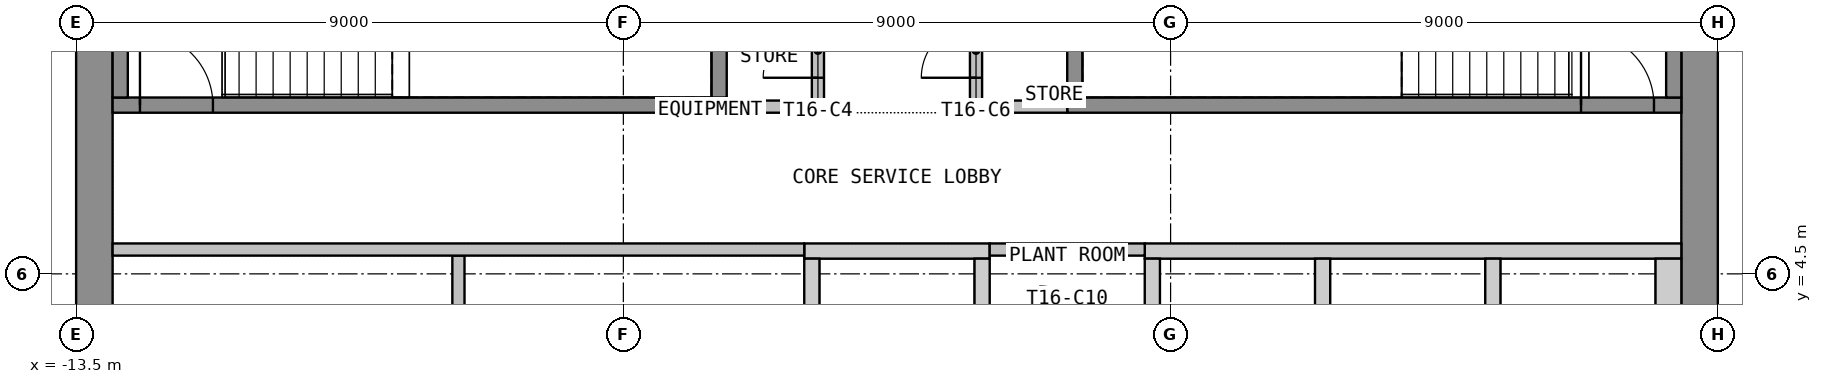
"""IFC4 building model, lengths in metres.
Left out: names, types, materials, properties, quantities, classifications, styles, units other than length and angle.
Written with IfcOpenShell. Run it as: python <this file> out.ifc"""

import sys

from ifc_helpers import new_model, si_unit, direction, frame, frame_2d, origin, place, context, subcontext, project, spatial, polyline, rectangle, outline, extrude, element, fill, save


model = new_model("IFC4")
c1 = context("Model", 3, precision=1e-05, world=origin(), true_north=direction((0.0, 1.0)))
c2 = subcontext(c1, "Body", "Model", "MODEL_VIEW")
j1 = project(units=[si_unit("LENGTHUNIT", "METRE"), si_unit("PLANEANGLEUNIT", "RADIAN")], contexts=[c1])
p1 = place(None, origin())
s1 = spatial("IfcSite", under=j1, at=p1, CompositionType="ELEMENT")
p2 = place(p1, origin())
s2 = spatial("IfcBuilding", under=s1, at=p2, CompositionType="ELEMENT")
p3 = place(p2, frame((0.0, 0.0, 219.0)))
s3 = spatial("IfcBuildingStorey", under=s2, at=p3, CompositionType="ELEMENT", Elevation=219.0)
p4 = place(p3, frame((-13.2, -10.65, 0.0), z_axis=(0.0, 0.0, 1.0), x_axis=(0.0, 1.0, 0.0)))
e1 = element("IfcWall", 1, at=p4, inside=s3, PredefinedType="SHEAR", context=c2, shape_type="SweptSolid", body=[
    extrude(rectangle(XDim=21.3, YDim=0.6, at=frame_2d((10.65, 0.0))), origin(), (0.0, 0.0, 1.0), 3.55),
])
p5 = place(p4, frame((9.45, 0.0, 0.0)))
e2 = element("IfcOpeningElement", 2, at=p5, cuts=e1, PredefinedType="OPENING", context=c2, shape_type="SweptSolid", body=[
    extrude(rectangle(XDim=2.4, YDim=2.1, at=frame_2d((1.2, 1.05))), frame((0.0, 0.31, 0.0), z_axis=(0.0, -1.0, 0.0), x_axis=(1.0, 0.0, 0.0)), (0.0, 0.0, 1.0), 0.62),
])
p6 = place(p3, frame((13.2, -10.65, 0.0), z_axis=(0.0, 0.0, 1.0), x_axis=(0.0, 1.0, 0.0)))
e3 = element("IfcWall", 3, at=p6, inside=s3, PredefinedType="SHEAR", context=c2, shape_type="SweptSolid", body=[
    extrude(rectangle(XDim=21.3, YDim=0.6, at=frame_2d((10.65, 0.0))), origin(), (0.0, 0.0, 1.0), 3.55),
])
p7 = place(p6, frame((9.45, 0.0, 0.0)))
e4 = element("IfcOpeningElement", 4, at=p7, cuts=e3, PredefinedType="OPENING", context=c2, shape_type="SweptSolid", body=[
    extrude(rectangle(XDim=2.4, YDim=2.1, at=frame_2d((1.2, 1.05))), frame((0.0, 0.31, 0.0), z_axis=(0.0, -1.0, 0.0), x_axis=(1.0, 0.0, 0.0)), (0.0, 0.0, 1.0), 0.62),
])
p8 = place(p3, origin())
e5 = element("IfcWall", 5, at=p8, inside=s3, PredefinedType="SHEAR", context=c2, shape_type="SweptSolid", body=[
    extrude(outline(polyline([(-1.525, 4.75), (1.525, 4.75), (1.525, 5.0), (-1.525, 5.0), (-1.525, 4.75)])), origin(), (0.0, 0.0, 1.0), 3.55),
])
p9 = place(p3, origin())
e6 = element("IfcWall", 6, at=p9, inside=s3, PredefinedType="SHEAR", context=c2, shape_type="SweptSolid", body=[
    extrude(outline(polyline([(4.075, 4.75), (12.9, 4.75), (12.9, 5.0), (4.075, 5.0), (4.075, 4.75)])), origin(), (0.0, 0.0, 1.0), 3.55),
])
p10 = place(p3, origin())
e7 = element("IfcWall", 7, at=p10, inside=s3, PredefinedType="SHEAR", context=c2, shape_type="SweptSolid", body=[
    extrude(outline(polyline([(-1.525, 2.05), (-1.275, 2.05), (-1.275, 4.75), (-1.525, 4.75), (-1.525, 2.05)])), origin(), (0.0, 0.0, 1.0), 3.55),
])
p11 = place(p3, origin())
e8 = element("IfcWall", 8, at=p11, inside=s3, PredefinedType="SHEAR", context=c2, shape_type="SweptSolid", body=[
    extrude(outline(polyline([(1.275, 2.05), (1.525, 2.05), (1.525, 4.75), (1.275, 4.75), (1.275, 2.05)])), origin(), (0.0, 0.0, 1.0), 3.55),
])
p12 = place(p3, origin())
e9 = element("IfcWall", 9, at=p12, inside=s3, PredefinedType="SHEAR", context=c2, shape_type="SweptSolid", body=[
    extrude(outline(polyline([(9.675, 2.05), (9.925, 2.05), (9.925, 4.75), (9.675, 4.75), (9.675, 2.05)])), origin(), (0.0, 0.0, 1.0), 3.55),
])
p13 = place(p3, origin())
e10 = element("IfcWall", 10, at=p13, inside=s3, PredefinedType="SHEAR", context=c2, shape_type="SweptSolid", body=[
    extrude(outline(polyline([(12.475, 2.05), (12.9, 2.05), (12.9, 4.75), (12.475, 4.75), (12.475, 2.05)])), origin(), (0.0, 0.0, 1.0), 3.55),
])
p14 = place(p3, origin())
e11 = element("IfcWall", 11, at=p14, inside=s3, PredefinedType="SHEAR", context=c2, shape_type="SweptSolid", body=[
    extrude(outline(polyline([(4.075, 3.05), (4.325, 3.05), (4.325, 4.75), (4.075, 4.75), (4.075, 3.05)])), origin(), (0.0, 0.0, 1.0), 3.55),
])
p15 = place(p3, origin())
e12 = element("IfcWall", 12, at=p15, inside=s3, PredefinedType="SHEAR", context=c2, shape_type="SweptSolid", body=[
    extrude(outline(polyline([(6.875, 3.05), (7.125, 3.05), (7.125, 4.75), (6.875, 4.75), (6.875, 3.05)])), origin(), (0.0, 0.0, 1.0), 3.55),
])
p16 = place(p3, frame((-12.9, 7.275, 0.0), z_axis=(0.0, 0.0, 1.0), x_axis=(1.0, 0.0, 0.0)))
e13 = element("IfcWall", 13, at=p16, inside=s3, PredefinedType="SHEAR", context=c2, shape_type="SweptSolid", body=[
    extrude(rectangle(XDim=10.1, YDim=0.25, at=frame_2d((5.05, 0.0))), origin(), (0.0, 0.0, 1.0), 3.55),
])
p17 = place(p16, frame((0.45, 0.0, 0.0)))
e14 = element("IfcOpeningElement", 14, at=p17, cuts=e13, PredefinedType="OPENING", context=c2, shape_type="SweptSolid", body=[
    extrude(rectangle(XDim=1.2, YDim=2.1, at=frame_2d((0.6, 1.05))), frame((0.0, 0.135, 0.0), z_axis=(0.0, -1.0, 0.0), x_axis=(1.0, 0.0, 0.0)), (0.0, 0.0, 1.0), 0.27),
])
for number, where, z_axis, x_axis in (
    (15, (-12.775, 7.4, 0.0), (0.0, 0.0, 1.0), (0.0, 1.0, 0.0)),
    (16, (-2.925, 7.4, 0.0), (0.0, 0.0, 1.0), (0.0, 1.0, 0.0)),
):
    element("IfcWall", number, at=place(p3, frame(where, z_axis=z_axis, x_axis=x_axis)), inside=s3, PredefinedType="SHEAR", context=c2, shape_type="SweptSolid", body=[
        extrude(rectangle(XDim=3.25, YDim=0.25, at=frame_2d((1.625, 0.0))), origin(), (0.0, 0.0, 1.0), 3.55),
    ])
p18 = place(p3, frame((2.8, 7.275, 0.0), z_axis=(0.0, 0.0, 1.0), x_axis=(1.0, 0.0, 0.0)))
e17 = element("IfcWall", 17, at=p18, inside=s3, PredefinedType="SHEAR", context=c2, shape_type="SweptSolid", body=[
    extrude(rectangle(XDim=10.1, YDim=0.25, at=frame_2d((5.05, 0.0))), origin(), (0.0, 0.0, 1.0), 3.55),
])
p19 = place(p18, frame((8.45, 0.0, 0.0)))
e18 = element("IfcOpeningElement", 18, at=p19, cuts=e17, PredefinedType="OPENING", context=c2, shape_type="SweptSolid", body=[
    extrude(rectangle(XDim=1.2, YDim=2.1, at=frame_2d((0.6, 1.05))), frame((0.0, 0.135, 0.0), z_axis=(0.0, -1.0, 0.0), x_axis=(1.0, 0.0, 0.0)), (0.0, 0.0, 1.0), 0.27),
])
for number, where, z_axis, x_axis in (
    (19, (2.925, 7.4, 0.0), (0.0, 0.0, 1.0), (0.0, 1.0, 0.0)),
    (20, (12.775, 7.4, 0.0), (0.0, 0.0, 1.0), (0.0, 1.0, 0.0)),
):
    element("IfcWall", number, at=place(p3, frame(where, z_axis=z_axis, x_axis=x_axis)), inside=s3, PredefinedType="SHEAR", context=c2, shape_type="SweptSolid", body=[
        extrude(rectangle(XDim=3.25, YDim=0.25, at=frame_2d((1.625, 0.0))), origin(), (0.0, 0.0, 1.0), 3.55),
    ])
for number, where, z_axis, x_axis in (
    (21, (-2.8, 7.25, 0.0), (0.0, 0.0, 1.0), (1.0, 0.0, 0.0)),
    (22, (1.4, 7.25, 0.0), (0.0, 0.0, 1.0), (1.0, 0.0, 0.0)),
):
    element("IfcWall", number, at=place(p3, frame(where, z_axis=z_axis, x_axis=x_axis)), inside=s3, PredefinedType="PARTITIONING", context=c2, shape_type="SweptSolid", body=[
        extrude(rectangle(XDim=1.4, YDim=0.2, at=frame_2d((0.7, 0.0))), origin(), (0.0, 0.0, 1.0), 3.55),
    ])
p20 = place(p3, frame((-1.3, 7.15, 0.0), z_axis=(0.0, 0.0, 1.0), x_axis=(0.0, 1.0, 0.0)))
e23 = element("IfcWall", 23, at=p20, inside=s3, PredefinedType="PARTITIONING", context=c2, shape_type="SweptSolid", body=[
    extrude(rectangle(XDim=3.5, YDim=0.2, at=frame_2d((1.75, 0.0))), origin(), (0.0, 0.0, 1.0), 3.55),
])
p21 = place(p20, frame((0.575, 0.0, 0.0)))
e24 = element("IfcOpeningElement", 24, at=p21, cuts=e23, PredefinedType="OPENING", context=c2, shape_type="SweptSolid", body=[
    extrude(rectangle(XDim=0.9, YDim=2.1, at=frame_2d((0.45, 1.05))), frame((0.0, 0.11, 0.0), z_axis=(0.0, -1.0, 0.0), x_axis=(1.0, 0.0, 0.0)), (0.0, 0.0, 1.0), 0.22),
])
p22 = place(p20, frame((2.225, 0.0, 0.0)))
e25 = element("IfcOpeningElement", 25, at=p22, cuts=e23, PredefinedType="OPENING", context=c2, shape_type="SweptSolid", body=[
    extrude(rectangle(XDim=0.9, YDim=2.1, at=frame_2d((0.45, 1.05))), frame((0.0, 0.11, 0.0), z_axis=(0.0, -1.0, 0.0), x_axis=(1.0, 0.0, 0.0)), (0.0, 0.0, 1.0), 0.22),
])
p23 = place(p3, frame((1.3, 7.15, 0.0), z_axis=(0.0, 0.0, 1.0), x_axis=(0.0, 1.0, 0.0)))
e26 = element("IfcWall", 26, at=p23, inside=s3, PredefinedType="PARTITIONING", context=c2, shape_type="SweptSolid", body=[
    extrude(rectangle(XDim=3.5, YDim=0.2, at=frame_2d((1.75, 0.0))), origin(), (0.0, 0.0, 1.0), 3.55),
])
p24 = place(p23, frame((0.575, 0.0, 0.0)))
e27 = element("IfcOpeningElement", 27, at=p24, cuts=e26, PredefinedType="OPENING", context=c2, shape_type="SweptSolid", body=[
    extrude(rectangle(XDim=0.9, YDim=2.1, at=frame_2d((0.45, 1.05))), frame((0.0, 0.11, 0.0), z_axis=(0.0, -1.0, 0.0), x_axis=(1.0, 0.0, 0.0)), (0.0, 0.0, 1.0), 0.22),
])
p25 = place(p23, frame((2.225, 0.0, 0.0)))
e28 = element("IfcOpeningElement", 28, at=p25, cuts=e26, PredefinedType="OPENING", context=c2, shape_type="SweptSolid", body=[
    extrude(rectangle(XDim=0.9, YDim=2.1, at=frame_2d((0.45, 1.05))), frame((0.0, 0.11, 0.0), z_axis=(0.0, -1.0, 0.0), x_axis=(1.0, 0.0, 0.0)), (0.0, 0.0, 1.0), 0.22),
])
p26 = place(p3, frame((-7.212, 2.0, 0.0), z_axis=(0.0, 0.0, 1.0), x_axis=(0.0, 1.0, 0.0)))
e29 = element("IfcWall", 29, at=p26, inside=s3, PredefinedType="PARTITIONING", context=c2, shape_type="SweptSolid", body=[
    extrude(rectangle(XDim=2.8, YDim=0.2, at=frame_2d((1.4, 0.0))), origin(), (0.0, 0.0, 1.0), 3.55),
])
p27 = place(p3, frame((-12.9, 4.9, 0.0), z_axis=(0.0, 0.0, 1.0), x_axis=(1.0, 0.0, 0.0)))
e30 = element("IfcWall", 30, at=p27, inside=s3, PredefinedType="PARTITIONING", context=c2, shape_type="SweptSolid", body=[
    extrude(rectangle(XDim=11.375, YDim=0.2, at=frame_2d((5.688, 0.0))), origin(), (0.0, 0.0, 1.0), 3.55),
])
p28 = place(p3, frame((1.525, 4.9, 0.0), z_axis=(0.0, 0.0, 1.0), x_axis=(1.0, 0.0, 0.0)))
e31 = element("IfcWall", 31, at=p28, inside=s3, PredefinedType="PARTITIONING", context=c2, shape_type="SweptSolid", body=[
    extrude(rectangle(XDim=2.55, YDim=0.2, at=frame_2d((1.275, 0.0))), origin(), (0.0, 0.0, 1.0), 3.55),
])
p29 = place(p17, origin())
e32 = element("IfcDoor", 32, at=p29, inside=s3, OperationType="SINGLE_SWING_LEFT", PredefinedType="DOOR", context=c2, shape_type="SweptSolid", body=[
    extrude(rectangle(XDim=1.2, YDim=2.1, at=frame_2d((0.6, 1.05))), frame((0.0, 0.025, 0.0), z_axis=(0.0, -1.0, 0.0), x_axis=(1.0, 0.0, 0.0)), (0.0, 0.0, 1.0), 0.05),
])
fill(e14, e32)
p30 = place(p19, origin())
e33 = element("IfcDoor", 33, at=p30, inside=s3, OperationType="SINGLE_SWING_LEFT", PredefinedType="DOOR", context=c2, shape_type="SweptSolid", body=[
    extrude(rectangle(XDim=1.2, YDim=2.1, at=frame_2d((0.6, 1.05))), frame((0.0, 0.025, 0.0), z_axis=(0.0, -1.0, 0.0), x_axis=(1.0, 0.0, 0.0)), (0.0, 0.0, 1.0), 0.05),
])
fill(e18, e33)
p31 = place(p21, origin())
e34 = element("IfcDoor", 34, at=p31, inside=s3, OperationType="SINGLE_SWING_LEFT", PredefinedType="DOOR", context=c2, shape_type="SweptSolid", body=[
    extrude(rectangle(XDim=0.9, YDim=2.1, at=frame_2d((0.45, 1.05))), frame((0.0, 0.025, 0.0), z_axis=(0.0, -1.0, 0.0), x_axis=(1.0, 0.0, 0.0)), (0.0, 0.0, 1.0), 0.05),
])
fill(e24, e34)
p32 = place(p24, origin())
e35 = element("IfcDoor", 35, at=p32, inside=s3, OperationType="SINGLE_SWING_LEFT", PredefinedType="DOOR", context=c2, shape_type="SweptSolid", body=[
    extrude(rectangle(XDim=0.9, YDim=2.1, at=frame_2d((0.45, 1.05))), frame((0.0, 0.025, 0.0), z_axis=(0.0, -1.0, 0.0), x_axis=(1.0, 0.0, 0.0)), (0.0, 0.0, 1.0), 0.05),
])
fill(e27, e35)
save(model, sys.argv[1])
